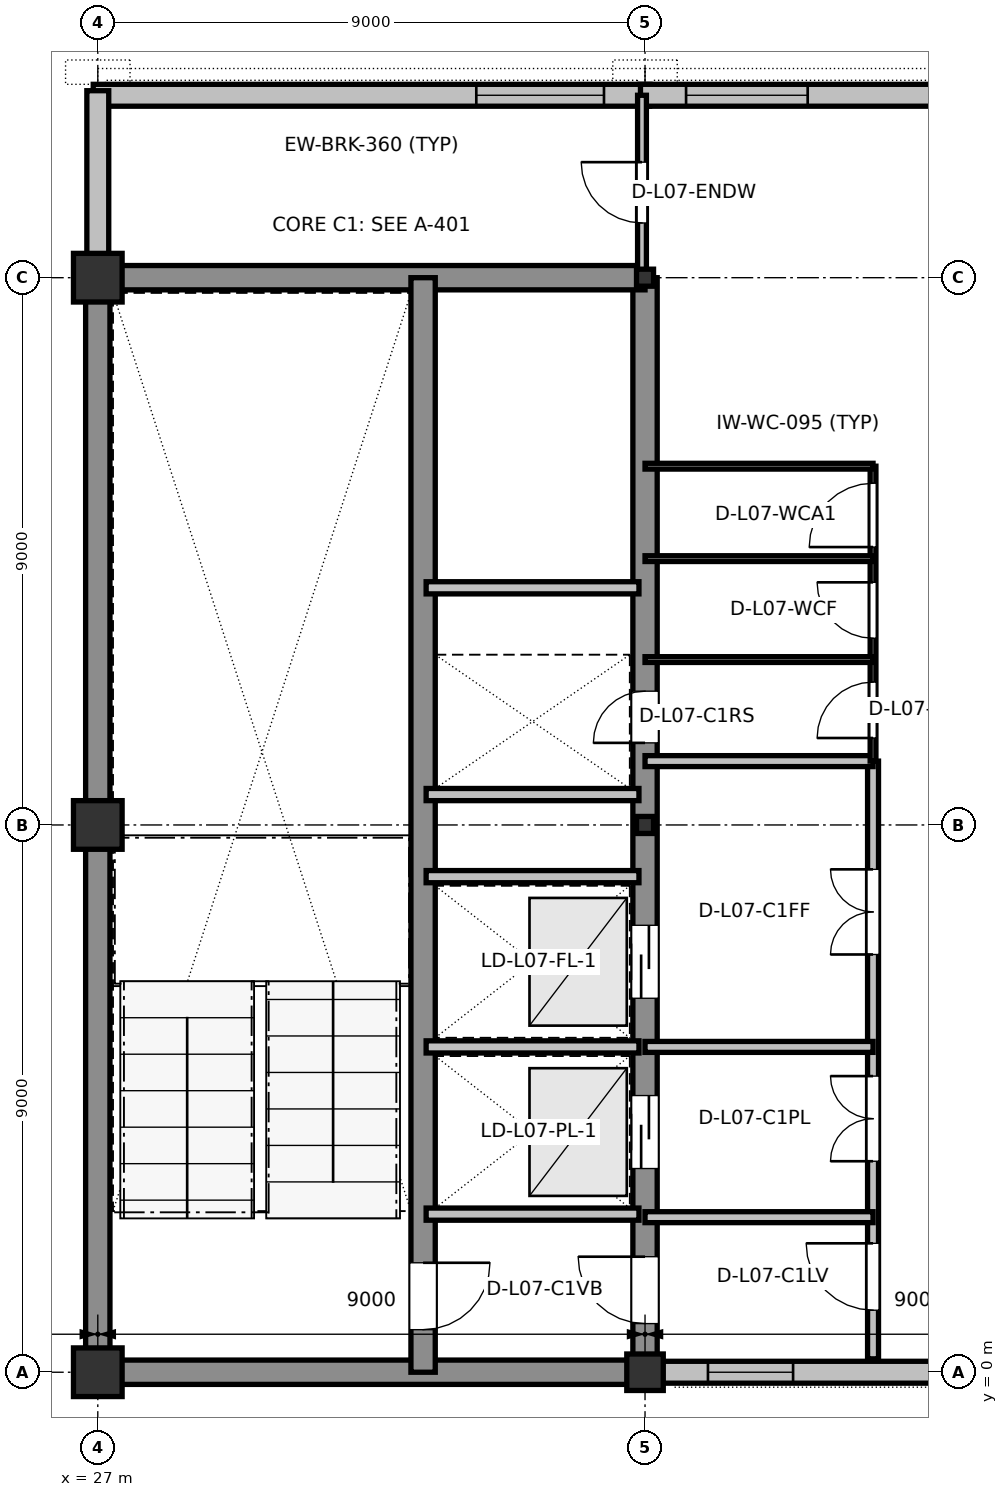
"""IFC4 building model, lengths in metres.
Left out: names, types, materials, properties, quantities, classifications, styles, units other than length and angle.
Written with IfcOpenShell. Run it as: python <this file> out.ifc"""

import sys

from ifc_helpers import new_model, si_unit, direction, frame, frame_2d, origin, origin_2d, place, context, subcontext, project, spatial, rectangle, i_section, extrude, element, fill, save


model = new_model("IFC4")
c1 = context("Model", 3, precision=1e-05, world=origin(), true_north=direction((0.0, 1.0)))
c2 = subcontext(c1, "Body", "Model", "MODEL_VIEW")
j1 = project(units=[si_unit("LENGTHUNIT", "METRE"), si_unit("PLANEANGLEUNIT", "RADIAN")], contexts=[c1])
p1 = place(None, origin())
s1 = spatial("IfcSite", under=j1, at=p1, CompositionType="ELEMENT")
p2 = place(p1, origin())
s2 = spatial("IfcBuilding", under=s1, at=p2, CompositionType="ELEMENT")
p3 = place(p2, frame((0.0, 0.0, 31.8)))
s3 = spatial("IfcBuildingStorey", under=s2, at=p3, CompositionType="ELEMENT", Elevation=31.8)
for number, where, z_axis, x_axis in (
    (1, (27.0, 0.0, 0.0), (0.0, 0.0, 1.0), (1.0, 0.0, 0.0)),
    (2, (27.0, 9.0, 0.0), (0.0, 0.0, 1.0), (1.0, 0.0, 0.0)),
    (3, (27.0, 18.0, 0.0), (0.0, 0.0, 1.0), (1.0, 0.0, 0.0)),
):
    element("IfcColumn", number, at=place(p3, frame(where, z_axis=z_axis, x_axis=x_axis)), inside=s3, PredefinedType="COLUMN", context=c2, shape_type="SweptSolid", body=[
        extrude(rectangle(XDim=0.8, YDim=0.8, at=origin_2d()), origin(), (0.0, 0.0, 1.0), 4.2),
    ])
p4 = place(p3, frame((36.0, 0.0, 0.0), z_axis=(0.0, 0.0, 1.0), x_axis=(1.0, 0.0, 0.0)))
e4 = element("IfcColumn", 4, at=p4, inside=s3, PredefinedType="COLUMN", context=c2, shape_type="SweptSolid", body=[
    extrude(rectangle(XDim=0.6, YDim=0.6, at=origin_2d()), origin(), (0.0, 0.0, 1.0), 4.2),
])
for number, where, z_axis, x_axis in (
    (5, (36.0, 9.0, 0.0), (0.0, 0.0, 1.0), (1.0, 0.0, 0.0)),
    (6, (36.0, 18.0, 0.0), (0.0, 0.0, 1.0), (1.0, 0.0, 0.0)),
):
    element("IfcColumn", number, at=place(p3, frame(where, z_axis=z_axis, x_axis=x_axis)), inside=s3, PredefinedType="COLUMN", context=c2, shape_type="SweptSolid", body=[
        extrude(i_section(OverallWidth=0.28, OverallDepth=0.28, WebThickness=0.01, FlangeThickness=0.018, at=origin_2d()), origin(), (0.0, 0.0, 1.0), 4.2),
    ])
p5 = place(p3, frame((36.075, 21.0, 0.0), z_axis=(0.0, 0.0, 1.0), x_axis=(-1.0, 0.0, 0.0)))
e7 = element("IfcWall", 7, at=p5, inside=s3, PredefinedType="STANDARD", context=c2, shape_type="SweptSolid", body=[
    extrude(rectangle(XDim=9.15, YDim=0.36, at=frame_2d((4.575, 0.0))), origin(), (0.0, 0.0, 1.0), 3.94),
])
p6 = place(p5, frame((0.75, 0.0, 0.9)))
e8 = element("IfcOpeningElement", 8, at=p6, cuts=e7, PredefinedType="OPENING", context=c2, shape_type="SweptSolid", body=[
    extrude(rectangle(XDim=2.1, YDim=2.25, at=frame_2d((1.05, 1.125))), frame((0.0, 0.19, 0.0), z_axis=(0.0, -1.0, 0.0), x_axis=(1.0, 0.0, 0.0)), (0.0, 0.0, 1.0), 0.38),
])
p7 = place(p3, frame((45.075, 21.0, 0.0), z_axis=(0.0, 0.0, 1.0), x_axis=(-1.0, 0.0, 0.0)))
e9 = element("IfcWall", 9, at=p7, inside=s3, PredefinedType="STANDARD", context=c2, shape_type="SweptSolid", body=[
    extrude(rectangle(XDim=9.15, YDim=0.36, at=frame_2d((4.575, 0.0))), origin(), (0.0, 0.0, 1.0), 3.94),
])
p8 = place(p7, frame((6.4, 0.0, 0.9)))
e10 = element("IfcOpeningElement", 10, at=p8, cuts=e9, PredefinedType="OPENING", context=c2, shape_type="SweptSolid", body=[
    extrude(rectangle(XDim=2.0, YDim=2.2, at=frame_2d((1.0, 1.1))), frame((0.0, 0.19, 0.0), z_axis=(0.0, -1.0, 0.0), x_axis=(1.0, 0.0, 0.0)), (0.0, 0.0, 1.0), 0.38),
])
p9 = place(p3, frame((27.0, 21.075, 0.0), z_axis=(0.0, 0.0, 1.0), x_axis=(0.0, -1.0, 0.0)))
e11 = element("IfcWall", 11, at=p9, inside=s3, PredefinedType="STANDARD", context=c2, shape_type="SweptSolid", body=[
    extrude(rectangle(XDim=2.69, YDim=0.36, at=frame_2d((1.345, 0.0))), origin(), (0.0, 0.0, 1.0), 3.94),
])
p10 = place(p3, frame((36.285, 0.0, 0.0), z_axis=(0.0, 0.0, 1.0), x_axis=(1.0, 0.0, 0.0)))
e12 = element("IfcWall", 12, at=p10, inside=s3, PredefinedType="STANDARD", context=c2, shape_type="SweptSolid", body=[
    extrude(rectangle(XDim=8.43, YDim=0.36, at=frame_2d((4.215, 0.0))), origin(), (0.0, 0.0, 1.0), 3.735),
])
p11 = place(p10, frame((0.75, 0.0, 0.9)))
e13 = element("IfcOpeningElement", 13, at=p11, cuts=e12, PredefinedType="OPENING", context=c2, shape_type="SweptSolid", body=[
    extrude(rectangle(XDim=1.4, YDim=1.9, at=frame_2d((0.7, 0.95))), frame((0.0, 0.19, 0.0), z_axis=(0.0, -1.0, 0.0), x_axis=(1.0, 0.0, 0.0)), (0.0, 0.0, 1.0), 0.38),
])
p12 = place(p3, frame((27.0, 0.0, 0.0), z_axis=(0.0, 0.0, 1.0), x_axis=(1.0, 0.0, 0.0)))
e14 = element("IfcWall", 14, at=p12, inside=s3, PredefinedType="SHEAR", context=c2, shape_type="SweptSolid", body=[
    extrude(rectangle(XDim=9.0, YDim=0.4, at=frame_2d((4.5, 0.0))), origin(), (0.0, 0.0, 1.0), 3.96),
])
p13 = place(p3, frame((36.0, 0.0, 0.0), z_axis=(0.0, 0.0, 1.0), x_axis=(0.0, 1.0, 0.0)))
e15 = element("IfcWall", 15, at=p13, inside=s3, PredefinedType="SHEAR", context=c2, shape_type="SweptSolid", body=[
    extrude(rectangle(XDim=18.0, YDim=0.4, at=frame_2d((9.0, 0.0))), origin(), (0.0, 0.0, 1.0), 3.96),
])
p14 = place(p13, frame((0.8, 0.0, 0.0)))
e16 = element("IfcOpeningElement", 16, at=p14, cuts=e15, PredefinedType="OPENING", context=c2, shape_type="SweptSolid", body=[
    extrude(rectangle(XDim=1.1, YDim=2.16, at=frame_2d((0.55, 1.08))), frame((0.0, 0.21, 0.0), z_axis=(0.0, -1.0, 0.0), x_axis=(1.0, 0.0, 0.0)), (0.0, 0.0, 1.0), 0.42),
])
p15 = place(p13, frame((3.35, 0.0, 0.0)))
e17 = element("IfcOpeningElement", 17, at=p15, cuts=e15, PredefinedType="OPENING", context=c2, shape_type="SweptSolid", body=[
    extrude(rectangle(XDim=1.2, YDim=2.2, at=frame_2d((0.6, 1.1))), frame((0.0, 0.21, 0.0), z_axis=(0.0, -1.0, 0.0), x_axis=(1.0, 0.0, 0.0)), (0.0, 0.0, 1.0), 0.42),
])
p16 = place(p13, frame((6.15, 0.0, 0.0)))
e18 = element("IfcOpeningElement", 18, at=p16, cuts=e15, PredefinedType="OPENING", context=c2, shape_type="SweptSolid", body=[
    extrude(rectangle(XDim=1.2, YDim=2.2, at=frame_2d((0.6, 1.1))), frame((0.0, 0.21, 0.0), z_axis=(0.0, -1.0, 0.0), x_axis=(1.0, 0.0, 0.0)), (0.0, 0.0, 1.0), 0.42),
])
p17 = place(p13, frame((10.35, 0.0, 0.0)))
e19 = element("IfcOpeningElement", 19, at=p17, cuts=e15, PredefinedType="OPENING", context=c2, shape_type="SweptSolid", body=[
    extrude(rectangle(XDim=0.85, YDim=2.1, at=frame_2d((0.425, 1.05))), frame((0.0, 0.21, 0.0), z_axis=(0.0, -1.0, 0.0), x_axis=(1.0, 0.0, 0.0)), (0.0, 0.0, 1.0), 0.42),
])
p18 = place(p3, frame((36.0, 18.0, 0.0), z_axis=(0.0, 0.0, 1.0), x_axis=(-1.0, 0.0, 0.0)))
e20 = element("IfcWall", 20, at=p18, inside=s3, PredefinedType="SHEAR", context=c2, shape_type="SweptSolid", body=[
    extrude(rectangle(XDim=9.0, YDim=0.4, at=frame_2d((4.5, 0.0))), origin(), (0.0, 0.0, 1.0), 3.96),
])
p19 = place(p3, frame((27.0, 18.0, 0.0), z_axis=(0.0, 0.0, 1.0), x_axis=(0.0, -1.0, 0.0)))
e21 = element("IfcWall", 21, at=p19, inside=s3, PredefinedType="SHEAR", context=c2, shape_type="SweptSolid", body=[
    extrude(rectangle(XDim=18.0, YDim=0.4, at=frame_2d((9.0, 0.0))), origin(), (0.0, 0.0, 1.0), 3.96),
])
p20 = place(p3, frame((32.35, 0.0, 0.0), z_axis=(0.0, 0.0, 1.0), x_axis=(0.0, 1.0, 0.0)))
e22 = element("IfcWall", 22, at=p20, inside=s3, PredefinedType="SHEAR", context=c2, shape_type="SweptSolid", body=[
    extrude(rectangle(XDim=18.0, YDim=0.4, at=frame_2d((9.0, 0.0))), origin(), (0.0, 0.0, 1.0), 3.96),
])
p21 = place(p20, frame((0.7, 0.0, 0.0)))
e23 = element("IfcOpeningElement", 23, at=p21, cuts=e22, PredefinedType="OPENING", context=c2, shape_type="SweptSolid", body=[
    extrude(rectangle(XDim=1.1, YDim=2.16, at=frame_2d((0.55, 1.08))), frame((0.0, 0.21, 0.0), z_axis=(0.0, -1.0, 0.0), x_axis=(1.0, 0.0, 0.0)), (0.0, 0.0, 1.0), 0.42),
])
for number, where, z_axis, x_axis in (
    (24, (32.4, 2.6, 0.0), (0.0, 0.0, 1.0), (1.0, 0.0, 0.0)),
    (25, (32.4, 5.35, 0.0), (0.0, 0.0, 1.0), (1.0, 0.0, 0.0)),
    (26, (32.4, 8.15, 0.0), (0.0, 0.0, 1.0), (1.0, 0.0, 0.0)),
    (27, (32.4, 9.5, 0.0), (0.0, 0.0, 1.0), (1.0, 0.0, 0.0)),
    (28, (32.4, 12.9, 0.0), (0.0, 0.0, 1.0), (1.0, 0.0, 0.0)),
):
    element("IfcWall", number, at=place(p3, frame(where, z_axis=z_axis, x_axis=x_axis)), inside=s3, PredefinedType="PARTITIONING", context=c2, shape_type="SweptSolid", body=[
        extrude(rectangle(XDim=3.5, YDim=0.2, at=frame_2d((1.75, 0.0))), origin(), (0.0, 0.0, 1.0), 3.96),
    ])
p22 = place(p3, frame((39.75, 0.22, 0.0), z_axis=(0.0, 0.0, 1.0), x_axis=(0.0, 1.0, 0.0)))
e29 = element("IfcWall", 29, at=p22, inside=s3, PredefinedType="PARTITIONING", context=c2, shape_type="SweptSolid", body=[
    extrude(rectangle(XDim=9.83, YDim=0.18, at=frame_2d((4.915, 0.0))), origin(), (0.0, 0.0, 1.0), 3.96),
])
p23 = place(p22, frame((0.8, 0.0, 0.0)))
e30 = element("IfcOpeningElement", 30, at=p23, cuts=e29, PredefinedType="OPENING", context=c2, shape_type="SweptSolid", body=[
    extrude(rectangle(XDim=1.1, YDim=2.16, at=frame_2d((0.55, 1.08))), frame((0.0, 0.1, 0.0), z_axis=(0.0, -1.0, 0.0), x_axis=(1.0, 0.0, 0.0)), (0.0, 0.0, 1.0), 0.2),
])
p24 = place(p22, frame((3.25, 0.0, 0.0)))
e31 = element("IfcOpeningElement", 31, at=p24, cuts=e29, PredefinedType="OPENING", context=c2, shape_type="SweptSolid", body=[
    extrude(rectangle(XDim=1.4, YDim=2.2, at=frame_2d((0.7, 1.1))), frame((0.0, 0.1, 0.0), z_axis=(0.0, -1.0, 0.0), x_axis=(1.0, 0.0, 0.0)), (0.0, 0.0, 1.0), 0.2),
])
p25 = place(p22, frame((6.65, 0.0, 0.0)))
e32 = element("IfcOpeningElement", 32, at=p25, cuts=e29, PredefinedType="OPENING", context=c2, shape_type="SweptSolid", body=[
    extrude(rectangle(XDim=1.4, YDim=2.2, at=frame_2d((0.7, 1.1))), frame((0.0, 0.1, 0.0), z_axis=(0.0, -1.0, 0.0), x_axis=(1.0, 0.0, 0.0)), (0.0, 0.0, 1.0), 0.2),
])
for number, where, z_axis, x_axis in (
    (33, (36.0, 2.55, 0.0), (0.0, 0.0, 1.0), (1.0, 0.0, 0.0)),
    (34, (36.0, 5.35, 0.0), (0.0, 0.0, 1.0), (1.0, 0.0, 0.0)),
    (35, (36.0, 10.05, 0.0), (0.0, 0.0, 1.0), (1.0, 0.0, 0.0)),
):
    element("IfcWall", number, at=place(p3, frame(where, z_axis=z_axis, x_axis=x_axis)), inside=s3, PredefinedType="PARTITIONING", context=c2, shape_type="SweptSolid", body=[
        extrude(rectangle(XDim=3.75, YDim=0.18, at=frame_2d((1.875, 0.0))), origin(), (0.0, 0.0, 1.0), 3.96),
    ])
p26 = place(p3, frame((39.75, 10.05, 0.0), z_axis=(0.0, 0.0, 1.0), x_axis=(0.0, 1.0, 0.0)))
e36 = element("IfcWall", 36, at=p26, inside=s3, PredefinedType="PARTITIONING", context=c2, shape_type="SweptSolid", body=[
    extrude(rectangle(XDim=4.85, YDim=0.095, at=frame_2d((2.425, 0.0))), origin(), (0.0, 0.0, 1.0), 3.96),
])
p27 = place(p26, frame((0.38, 0.0, 0.0)))
e37 = element("IfcOpeningElement", 37, at=p27, cuts=e36, PredefinedType="OPENING", context=c2, shape_type="SweptSolid", body=[
    extrude(rectangle(XDim=0.92, YDim=2.1, at=frame_2d((0.46, 1.05))), frame((0.0, 0.057, 0.0), z_axis=(0.0, -1.0, 0.0), x_axis=(1.0, 0.0, 0.0)), (0.0, 0.0, 1.0), 0.115),
])
p28 = place(p26, frame((2.02, 0.0, 0.0)))
e38 = element("IfcOpeningElement", 38, at=p28, cuts=e36, PredefinedType="OPENING", context=c2, shape_type="SweptSolid", body=[
    extrude(rectangle(XDim=0.92, YDim=2.1, at=frame_2d((0.46, 1.05))), frame((0.0, 0.057, 0.0), z_axis=(0.0, -1.0, 0.0), x_axis=(1.0, 0.0, 0.0)), (0.0, 0.0, 1.0), 0.115),
])
p29 = place(p26, frame((3.52, 0.0, 0.0)))
e39 = element("IfcOpeningElement", 39, at=p29, cuts=e36, PredefinedType="OPENING", context=c2, shape_type="SweptSolid", body=[
    extrude(rectangle(XDim=1.05, YDim=2.13, at=frame_2d((0.525, 1.065))), frame((0.0, 0.057, 0.0), z_axis=(0.0, -1.0, 0.0), x_axis=(1.0, 0.0, 0.0)), (0.0, 0.0, 1.0), 0.115),
])
for number, where, z_axis, x_axis in (
    (40, (36.0, 11.72, 0.0), (0.0, 0.0, 1.0), (1.0, 0.0, 0.0)),
    (41, (36.0, 13.38, 0.0), (0.0, 0.0, 1.0), (1.0, 0.0, 0.0)),
):
    element("IfcWall", number, at=place(p3, frame(where, z_axis=z_axis, x_axis=x_axis)), inside=s3, PredefinedType="PARTITIONING", context=c2, shape_type="SweptSolid", body=[
        extrude(rectangle(XDim=3.75, YDim=0.095, at=frame_2d((1.875, 0.0))), origin(), (0.0, 0.0, 1.0), 3.96),
    ])
p30 = place(p3, frame((36.0, 14.9, 0.0), z_axis=(0.0, 0.0, 1.0), x_axis=(1.0, 0.0, 0.0)))
e42 = element("IfcWall", 42, at=p30, inside=s3, PredefinedType="PARTITIONING", context=c2, shape_type="SweptSolid", body=[
    extrude(rectangle(XDim=3.75, YDim=0.095, at=frame_2d((1.875, 0.0))), origin(), (0.0, 0.0, 1.0), 3.725),
])
p31 = place(p3, frame((35.95, 18.0, 0.0), z_axis=(0.0, 0.0, 1.0), x_axis=(0.0, 1.0, 0.0)))
e43 = element("IfcWall", 43, at=p31, inside=s3, PredefinedType="PARTITIONING", context=c2, shape_type="SweptSolid", body=[
    extrude(rectangle(XDim=3.0, YDim=0.145, at=frame_2d((1.5, 0.0))), origin(), (0.0, 0.0, 1.0), 3.96),
])
p32 = place(p31, frame((0.9, 0.0, 0.0)))
e44 = element("IfcOpeningElement", 44, at=p32, cuts=e43, PredefinedType="OPENING", context=c2, shape_type="SweptSolid", body=[
    extrude(rectangle(XDim=1.0, YDim=2.14, at=frame_2d((0.5, 1.07))), frame((0.0, 0.083, 0.0), z_axis=(0.0, -1.0, 0.0), x_axis=(1.0, 0.0, 0.0)), (0.0, 0.0, 1.0), 0.165),
])
p33 = place(p6, origin())
e45 = element("IfcWindow", 45, at=p33, inside=s3, PartitioningType="SINGLE_PANEL", PredefinedType="WINDOW", context=c2, shape_type="SweptSolid", body=[
    extrude(rectangle(XDim=2.1, YDim=2.25, at=frame_2d((1.05, 1.125))), frame((0.0, 0.03, 0.0), z_axis=(0.0, -1.0, 0.0), x_axis=(1.0, 0.0, 0.0)), (0.0, 0.0, 1.0), 0.06),
])
fill(e8, e45)
p34 = place(p8, origin())
e46 = element("IfcWindow", 46, at=p34, inside=s3, PartitioningType="SINGLE_PANEL", PredefinedType="WINDOW", context=c2, shape_type="SweptSolid", body=[
    extrude(rectangle(XDim=2.0, YDim=2.2, at=frame_2d((1.0, 1.1))), frame((0.0, 0.03, 0.0), z_axis=(0.0, -1.0, 0.0), x_axis=(1.0, 0.0, 0.0)), (0.0, 0.0, 1.0), 0.06),
])
fill(e10, e46)
p35 = place(p11, origin())
e47 = element("IfcWindow", 47, at=p35, inside=s3, PartitioningType="SINGLE_PANEL", PredefinedType="WINDOW", context=c2, shape_type="SweptSolid", body=[
    extrude(rectangle(XDim=1.4, YDim=1.9, at=frame_2d((0.7, 0.95))), frame((0.0, 0.03, 0.0), z_axis=(0.0, -1.0, 0.0), x_axis=(1.0, 0.0, 0.0)), (0.0, 0.0, 1.0), 0.06),
])
fill(e13, e47)
p36 = place(p21, frame((1.1, 0.0, 0.0), z_axis=(0.0, 0.0, 1.0), x_axis=(-1.0, 0.0, 0.0)))
e48 = element("IfcDoor", 48, at=p36, inside=s3, OperationType="SINGLE_SWING_LEFT", PredefinedType="DOOR", context=c2, shape_type="SweptSolid", body=[
    extrude(rectangle(XDim=1.1, YDim=2.16, at=frame_2d((0.55, 1.08))), frame((0.0, 0.025, 0.0), z_axis=(0.0, -1.0, 0.0), x_axis=(1.0, 0.0, 0.0)), (0.0, 0.0, 1.0), 0.05),
])
fill(e23, e48)
p37 = place(p14, origin())
e49 = element("IfcDoor", 49, at=p37, inside=s3, OperationType="SINGLE_SWING_RIGHT", PredefinedType="DOOR", context=c2, shape_type="SweptSolid", body=[
    extrude(rectangle(XDim=1.1, YDim=2.16, at=frame_2d((0.55, 1.08))), frame((0.0, 0.025, 0.0), z_axis=(0.0, -1.0, 0.0), x_axis=(1.0, 0.0, 0.0)), (0.0, 0.0, 1.0), 0.05),
])
fill(e16, e49)
p38 = place(p15, origin())
e50 = element("IfcDoor", 50, at=p38, inside=s3, OperationType="SLIDING_TO_LEFT", PredefinedType="DOOR", context=c2, shape_type="SweptSolid", body=[
    extrude(rectangle(XDim=1.2, YDim=2.2, at=frame_2d((0.6, 1.1))), frame((0.0, 0.025, 0.0), z_axis=(0.0, -1.0, 0.0), x_axis=(1.0, 0.0, 0.0)), (0.0, 0.0, 1.0), 0.05),
])
fill(e17, e50)
p39 = place(p16, origin())
e51 = element("IfcDoor", 51, at=p39, inside=s3, OperationType="SLIDING_TO_LEFT", PredefinedType="DOOR", context=c2, shape_type="SweptSolid", body=[
    extrude(rectangle(XDim=1.2, YDim=2.2, at=frame_2d((0.6, 1.1))), frame((0.0, 0.025, 0.0), z_axis=(0.0, -1.0, 0.0), x_axis=(1.0, 0.0, 0.0)), (0.0, 0.0, 1.0), 0.05),
])
fill(e18, e51)
p40 = place(p17, origin())
e52 = element("IfcDoor", 52, at=p40, inside=s3, OperationType="SINGLE_SWING_LEFT", PredefinedType="DOOR", context=c2, shape_type="SweptSolid", body=[
    extrude(rectangle(XDim=0.85, YDim=2.1, at=frame_2d((0.425, 1.05))), frame((0.0, 0.025, 0.0), z_axis=(0.0, -1.0, 0.0), x_axis=(1.0, 0.0, 0.0)), (0.0, 0.0, 1.0), 0.05),
])
fill(e19, e52)
p41 = place(p23, origin())
e53 = element("IfcDoor", 53, at=p41, inside=s3, OperationType="SINGLE_SWING_RIGHT", PredefinedType="DOOR", context=c2, shape_type="SweptSolid", body=[
    extrude(rectangle(XDim=1.1, YDim=2.16, at=frame_2d((0.55, 1.08))), frame((0.0, 0.025, 0.0), z_axis=(0.0, -1.0, 0.0), x_axis=(1.0, 0.0, 0.0)), (0.0, 0.0, 1.0), 0.05),
])
fill(e30, e53)
p42 = place(p24, origin())
e54 = element("IfcDoor", 54, at=p42, inside=s3, OperationType="DOUBLE_DOOR_SINGLE_SWING", PredefinedType="DOOR", context=c2, shape_type="SweptSolid", body=[
    extrude(rectangle(XDim=1.4, YDim=2.2, at=frame_2d((0.7, 1.1))), frame((0.0, 0.025, 0.0), z_axis=(0.0, -1.0, 0.0), x_axis=(1.0, 0.0, 0.0)), (0.0, 0.0, 1.0), 0.05),
])
fill(e31, e54)
p43 = place(p25, origin())
e55 = element("IfcDoor", 55, at=p43, inside=s3, OperationType="DOUBLE_DOOR_SINGLE_SWING", PredefinedType="DOOR", context=c2, shape_type="SweptSolid", body=[
    extrude(rectangle(XDim=1.4, YDim=2.2, at=frame_2d((0.7, 1.1))), frame((0.0, 0.025, 0.0), z_axis=(0.0, -1.0, 0.0), x_axis=(1.0, 0.0, 0.0)), (0.0, 0.0, 1.0), 0.05),
])
fill(e32, e55)
p44 = place(p27, origin())
e56 = element("IfcDoor", 56, at=p44, inside=s3, OperationType="SINGLE_SWING_LEFT", PredefinedType="DOOR", context=c2, shape_type="SweptSolid", body=[
    extrude(rectangle(XDim=0.92, YDim=2.1, at=frame_2d((0.46, 1.05))), frame((0.0, 0.025, 0.0), z_axis=(0.0, -1.0, 0.0), x_axis=(1.0, 0.0, 0.0)), (0.0, 0.0, 1.0), 0.05),
])
fill(e37, e56)
p45 = place(p28, origin())
e57 = element("IfcDoor", 57, at=p45, inside=s3, OperationType="SINGLE_SWING_RIGHT", PredefinedType="DOOR", context=c2, shape_type="SweptSolid", body=[
    extrude(rectangle(XDim=0.92, YDim=2.1, at=frame_2d((0.46, 1.05))), frame((0.0, 0.025, 0.0), z_axis=(0.0, -1.0, 0.0), x_axis=(1.0, 0.0, 0.0)), (0.0, 0.0, 1.0), 0.05),
])
fill(e38, e57)
p46 = place(p29, origin())
e58 = element("IfcDoor", 58, at=p46, inside=s3, OperationType="SINGLE_SWING_LEFT", PredefinedType="DOOR", context=c2, shape_type="SweptSolid", body=[
    extrude(rectangle(XDim=1.05, YDim=2.13, at=frame_2d((0.525, 1.065))), frame((0.0, 0.025, 0.0), z_axis=(0.0, -1.0, 0.0), x_axis=(1.0, 0.0, 0.0)), (0.0, 0.0, 1.0), 0.05),
])
fill(e39, e58)
p47 = place(p32, origin())
e59 = element("IfcDoor", 59, at=p47, inside=s3, OperationType="SINGLE_SWING_RIGHT", PredefinedType="DOOR", context=c2, shape_type="SweptSolid", body=[
    extrude(rectangle(XDim=1.0, YDim=2.14, at=frame_2d((0.5, 1.07))), frame((0.0, 0.025, 0.0), z_axis=(0.0, -1.0, 0.0), x_axis=(1.0, 0.0, 0.0)), (0.0, 0.0, 1.0), 0.05),
])
fill(e44, e59)
save(model, sys.argv[1])
